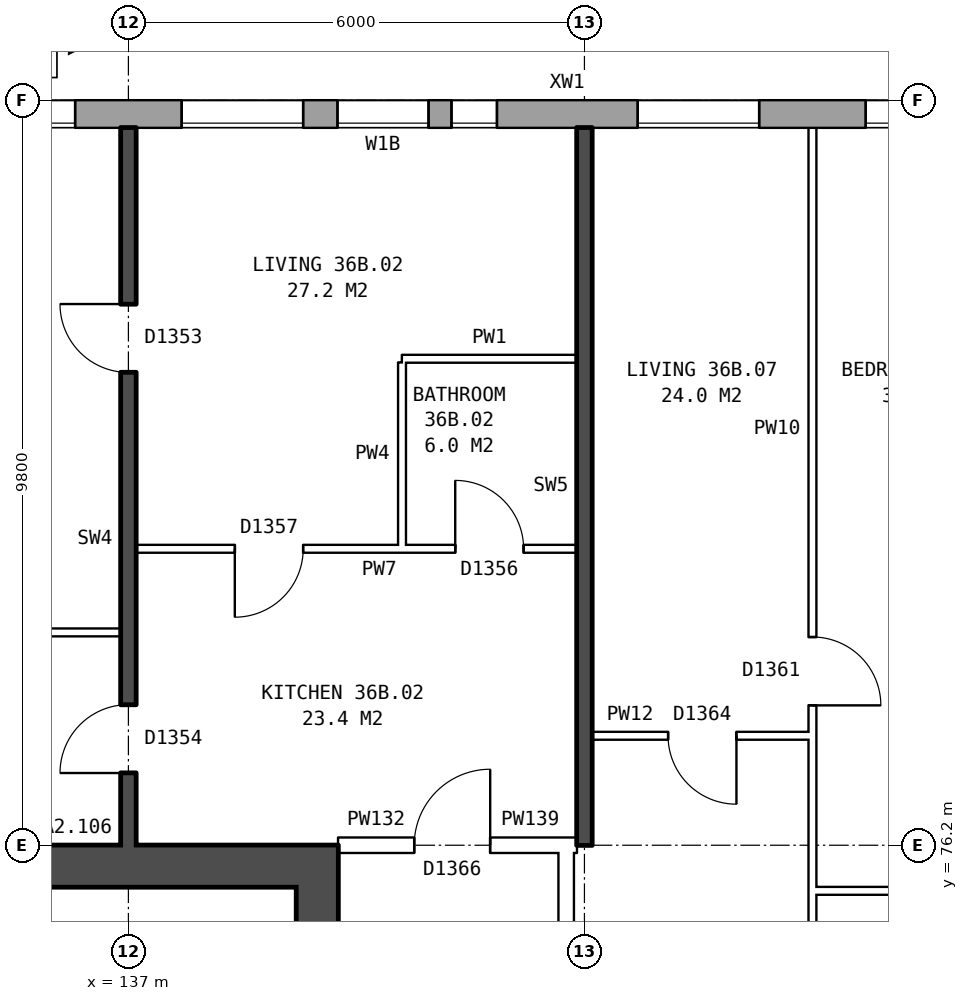
"""IFC4 building model, lengths in metres.
Left out: names, types, materials, properties, quantities, classifications, styles, units other than length and angle.
Written with IfcOpenShell. Run it as: python <this file> out.ifc"""

import sys

from ifc_helpers import new_model, si_unit, direction, frame, frame_2d, origin, place, context, subcontext, project, spatial, rectangle, extrude, element, fill, save


model = new_model("IFC4")
c1 = context("Model", 3, precision=1e-05, world=origin(), true_north=direction((0.0, 1.0)))
c2 = subcontext(c1, "Body", "Model", "MODEL_VIEW")
j1 = project(units=[si_unit("LENGTHUNIT", "METRE"), si_unit("PLANEANGLEUNIT", "RADIAN")], contexts=[c1])
p1 = place(None, origin())
s1 = spatial("IfcSite", under=j1, at=p1, CompositionType="ELEMENT")
p2 = place(p1, origin())
s2 = spatial("IfcBuilding", under=s1, at=p2, CompositionType="ELEMENT")
p3 = place(p2, frame((0.0, 0.0, 129.9)))
s3 = spatial("IfcBuildingStorey", under=s2, at=p3, CompositionType="ELEMENT", Elevation=129.9)
p4 = place(p3, frame((169.675, 85.82, 0.0), z_axis=(0.0, 0.0, 1.0), x_axis=(-1.0, 0.0, 0.0)))
e1 = element("IfcWall", 1, at=p4, inside=s3, PredefinedType="STANDARD", context=c2, shape_type="SweptSolid", body=[
    extrude(rectangle(XDim=35.601, YDim=0.36, at=frame_2d((17.8, 0.0))), origin(), (0.0, 0.0, 1.0), 2.85),
])
p5 = place(p4, frame((0.375, 0.0, 0.8)))
e2 = element("IfcOpeningElement", 2, at=p5, cuts=e1, PredefinedType="OPENING", context=c2, shape_type="SweptSolid", body=[
    extrude(rectangle(XDim=1.6, YDim=1.8, at=frame_2d((0.8, 0.9))), frame((0.0, 0.19, 0.0), z_axis=(0.0, -1.0, 0.0), x_axis=(1.0, 0.0, 0.0)), (0.0, 0.0, 1.0), 0.38),
])
p6 = place(p4, frame((3.375, 0.0, 0.8)))
e3 = element("IfcOpeningElement", 3, at=p6, cuts=e1, PredefinedType="OPENING", context=c2, shape_type="SweptSolid", body=[
    extrude(rectangle(XDim=1.6, YDim=1.8, at=frame_2d((0.8, 0.9))), frame((0.0, 0.19, 0.0), z_axis=(0.0, -1.0, 0.0), x_axis=(1.0, 0.0, 0.0)), (0.0, 0.0, 1.0), 0.38),
])
p7 = place(p4, frame((5.275, 0.0, 0.8)))
e4 = element("IfcOpeningElement", 4, at=p7, cuts=e1, PredefinedType="OPENING", context=c2, shape_type="SweptSolid", body=[
    extrude(rectangle(XDim=1.6, YDim=1.8, at=frame_2d((0.8, 0.9))), frame((0.0, 0.19, 0.0), z_axis=(0.0, -1.0, 0.0), x_axis=(1.0, 0.0, 0.0)), (0.0, 0.0, 1.0), 0.38),
])
p8 = place(p4, frame((9.375, 0.0, 0.8)))
e5 = element("IfcOpeningElement", 5, at=p8, cuts=e1, PredefinedType="OPENING", context=c2, shape_type="SweptSolid", body=[
    extrude(rectangle(XDim=1.6, YDim=1.8, at=frame_2d((0.8, 0.9))), frame((0.0, 0.19, 0.0), z_axis=(0.0, -1.0, 0.0), x_axis=(1.0, 0.0, 0.0)), (0.0, 0.0, 1.0), 0.38),
])
p9 = place(p4, frame((12.375, 0.0, 0.8)))
e6 = element("IfcOpeningElement", 6, at=p9, cuts=e1, PredefinedType="OPENING", context=c2, shape_type="SweptSolid", body=[
    extrude(rectangle(XDim=1.6, YDim=1.8, at=frame_2d((0.8, 0.9))), frame((0.0, 0.19, 0.0), z_axis=(0.0, -1.0, 0.0), x_axis=(1.0, 0.0, 0.0)), (0.0, 0.0, 1.0), 0.38),
])
p10 = place(p4, frame((15.375, 0.0, 0.8)))
e7 = element("IfcOpeningElement", 7, at=p10, cuts=e1, PredefinedType="OPENING", context=c2, shape_type="SweptSolid", body=[
    extrude(rectangle(XDim=1.6, YDim=1.8, at=frame_2d((0.8, 0.9))), frame((0.0, 0.19, 0.0), z_axis=(0.0, -1.0, 0.0), x_axis=(1.0, 0.0, 0.0)), (0.0, 0.0, 1.0), 0.38),
])
p11 = place(p4, frame((18.375, 0.0, 0.8)))
e8 = element("IfcOpeningElement", 8, at=p11, cuts=e1, PredefinedType="OPENING", context=c2, shape_type="SweptSolid", body=[
    extrude(rectangle(XDim=1.6, YDim=1.8, at=frame_2d((0.8, 0.9))), frame((0.0, 0.19, 0.0), z_axis=(0.0, -1.0, 0.0), x_axis=(1.0, 0.0, 0.0)), (0.0, 0.0, 1.0), 0.38),
])
p12 = place(p4, frame((21.375, 0.0, 0.8)))
e9 = element("IfcOpeningElement", 9, at=p12, cuts=e1, PredefinedType="OPENING", context=c2, shape_type="SweptSolid", body=[
    extrude(rectangle(XDim=1.6, YDim=1.8, at=frame_2d((0.8, 0.9))), frame((0.0, 0.19, 0.0), z_axis=(0.0, -1.0, 0.0), x_axis=(1.0, 0.0, 0.0)), (0.0, 0.0, 1.0), 0.38),
])
p13 = place(p4, frame((24.375, 0.0, 0.8)))
e10 = element("IfcOpeningElement", 10, at=p13, cuts=e1, PredefinedType="OPENING", context=c2, shape_type="SweptSolid", body=[
    extrude(rectangle(XDim=1.6, YDim=1.8, at=frame_2d((0.8, 0.9))), frame((0.0, 0.19, 0.0), z_axis=(0.0, -1.0, 0.0), x_axis=(1.0, 0.0, 0.0)), (0.0, 0.0, 1.0), 0.38),
])
p14 = place(p4, frame((27.825, 0.0, 1.7)))
e11 = element("IfcOpeningElement", 11, at=p14, cuts=e1, PredefinedType="OPENING", context=c2, shape_type="SweptSolid", body=[
    extrude(rectangle(XDim=0.6, YDim=0.9, at=frame_2d((0.3, 0.45))), frame((0.0, 0.19, 0.0), z_axis=(0.0, -1.0, 0.0), x_axis=(1.0, 0.0, 0.0)), (0.0, 0.0, 1.0), 0.38),
])
p15 = place(p4, frame((30.375, 0.0, 0.8)))
e12 = element("IfcOpeningElement", 12, at=p15, cuts=e1, PredefinedType="OPENING", context=c2, shape_type="SweptSolid", body=[
    extrude(rectangle(XDim=1.6, YDim=1.8, at=frame_2d((0.8, 0.9))), frame((0.0, 0.19, 0.0), z_axis=(0.0, -1.0, 0.0), x_axis=(1.0, 0.0, 0.0)), (0.0, 0.0, 1.0), 0.38),
])
p16 = place(p4, frame((33.375, 0.0, 0.8)))
e13 = element("IfcOpeningElement", 13, at=p16, cuts=e1, PredefinedType="OPENING", context=c2, shape_type="SweptSolid", body=[
    extrude(rectangle(XDim=1.6, YDim=1.8, at=frame_2d((0.8, 0.9))), frame((0.0, 0.19, 0.0), z_axis=(0.0, -1.0, 0.0), x_axis=(1.0, 0.0, 0.0)), (0.0, 0.0, 1.0), 0.38),
])
p17 = place(p4, frame((7.175, 0.0, 1.7)))
e14 = element("IfcOpeningElement", 14, at=p17, cuts=e1, PredefinedType="OPENING", context=c2, shape_type="SweptSolid", body=[
    extrude(rectangle(XDim=0.6, YDim=0.9, at=frame_2d((0.3, 0.45))), frame((0.0, 0.19, 0.0), z_axis=(0.0, -1.0, 0.0), x_axis=(1.0, 0.0, 0.0)), (0.0, 0.0, 1.0), 0.38),
])
p18 = place(p4, frame((28.725, 0.0, 0.8)))
e15 = element("IfcOpeningElement", 15, at=p18, cuts=e1, PredefinedType="OPENING", context=c2, shape_type="SweptSolid", body=[
    extrude(rectangle(XDim=1.2, YDim=1.8, at=frame_2d((0.6, 0.9))), frame((0.0, 0.19, 0.0), z_axis=(0.0, -1.0, 0.0), x_axis=(1.0, 0.0, 0.0)), (0.0, 0.0, 1.0), 0.38),
])
p19 = place(p3, frame((139.485, 63.8, 0.0), z_axis=(0.0, 0.0, 1.0), x_axis=(0.0, 1.0, 0.0)))
e16 = element("IfcWall", 16, at=p19, inside=s3, PredefinedType="SHEAR", context=c2, shape_type="SweptSolid", body=[
    extrude(rectangle(XDim=12.4, YDim=0.55, at=frame_2d((6.2, 0.0))), origin(), (0.0, 0.0, 1.0), 2.85),
])
p20 = place(p19, frame((1.325, 0.0, 0.0)))
e17 = element("IfcOpeningElement", 17, at=p20, cuts=e16, PredefinedType="OPENING", context=c2, shape_type="SweptSolid", body=[
    extrude(rectangle(XDim=1.1, YDim=2.1, at=frame_2d((0.55, 1.05))), frame((0.0, 0.285, 0.0), z_axis=(0.0, -1.0, 0.0), x_axis=(1.0, 0.0, 0.0)), (0.0, 0.0, 1.0), 0.57),
])
p21 = place(p19, frame((3.6, 0.0, 0.0)))
e18 = element("IfcOpeningElement", 18, at=p21, cuts=e16, PredefinedType="OPENING", context=c2, shape_type="SweptSolid", body=[
    extrude(rectangle(XDim=1.1, YDim=2.1, at=frame_2d((0.55, 1.05))), frame((0.0, 0.285, 0.0), z_axis=(0.0, -1.0, 0.0), x_axis=(1.0, 0.0, 0.0)), (0.0, 0.0, 1.0), 0.57),
])
p22 = place(p19, frame((5.8, 0.0, 0.0)))
e19 = element("IfcOpeningElement", 19, at=p22, cuts=e16, PredefinedType="OPENING", context=c2, shape_type="SweptSolid", body=[
    extrude(rectangle(XDim=1.1, YDim=2.1, at=frame_2d((0.55, 1.05))), frame((0.0, 0.285, 0.0), z_axis=(0.0, -1.0, 0.0), x_axis=(1.0, 0.0, 0.0)), (0.0, 0.0, 1.0), 0.57),
])
p23 = place(p19, frame((9.9, 0.0, 0.0)))
e20 = element("IfcOpeningElement", 20, at=p23, cuts=e16, PredefinedType="OPENING", context=c2, shape_type="SweptSolid", body=[
    extrude(rectangle(XDim=1.1, YDim=2.1, at=frame_2d((0.55, 1.05))), frame((0.0, 0.285, 0.0), z_axis=(0.0, -1.0, 0.0), x_axis=(1.0, 0.0, 0.0)), (0.0, 0.0, 1.0), 0.57),
])
p24 = place(p19, frame((8.125, 0.0, 0.0)))
e21 = element("IfcOpeningElement", 21, at=p24, cuts=e16, PredefinedType="OPENING", context=c2, shape_type="SweptSolid", body=[
    extrude(rectangle(XDim=0.85, YDim=2.1, at=frame_2d((0.425, 1.05))), frame((0.0, 0.285, 0.0), z_axis=(0.0, -1.0, 0.0), x_axis=(1.0, 0.0, 0.0)), (0.0, 0.0, 1.0), 0.57),
])
p25 = place(p3, frame((139.21, 75.925, 0.0), z_axis=(0.0, 0.0, 1.0), x_axis=(-1.0, 0.0, 0.0)))
e22 = element("IfcWall", 22, at=p25, inside=s3, PredefinedType="SHEAR", context=c2, shape_type="SweptSolid", body=[
    extrude(rectangle(XDim=7.3, YDim=0.55, at=frame_2d((3.65, 0.0))), origin(), (0.0, 0.0, 1.0), 2.85),
])
p26 = place(p3, frame((142.76, 63.9, 0.0), z_axis=(0.0, 0.0, 1.0), x_axis=(0.0, 1.0, 0.0)))
e23 = element("IfcWall", 23, at=p26, inside=s3, PredefinedType="PARTITIONING", context=c2, shape_type="SweptSolid", body=[
    extrude(rectangle(XDim=12.2, YDim=0.2, at=frame_2d((6.1, 0.0))), origin(), (0.0, 0.0, 1.0), 2.85),
])
p27 = place(p26, frame((5.1, 0.0, 0.0)))
e24 = element("IfcOpeningElement", 24, at=p27, cuts=e23, PredefinedType="OPENING", context=c2, shape_type="SweptSolid", body=[
    extrude(rectangle(XDim=2.0, YDim=2.1, at=frame_2d((1.0, 1.05))), frame((0.0, 0.11, 0.0), z_axis=(0.0, -1.0, 0.0), x_axis=(1.0, 0.0, 0.0)), (0.0, 0.0, 1.0), 0.22),
])
p28 = place(p3, frame((146.0, 75.6, 0.0), z_axis=(0.0, 0.0, 1.0), x_axis=(1.0, 0.0, 0.0)))
e25 = element("IfcWall", 25, at=p28, inside=s3, PredefinedType="PARTITIONING", context=c2, shape_type="SweptSolid", body=[
    extrude(rectangle(XDim=6.0, YDim=0.1, at=frame_2d((3.0, 0.0))), origin(), (0.0, 0.0, 1.0), 2.85),
])
p29 = place(p3, frame((139.76, 76.2, 0.0), z_axis=(0.0, 0.0, 1.0), x_axis=(1.0, 0.0, 0.0)))
e26 = element("IfcWall", 26, at=p29, inside=s3, PredefinedType="PARTITIONING", context=c2, shape_type="SweptSolid", body=[
    extrude(rectangle(XDim=3.0, YDim=0.2, at=frame_2d((1.5, 0.0))), origin(), (0.0, 0.0, 1.0), 2.85),
])
p30 = place(p29, frame((1.0, 0.0, 0.0)))
e27 = element("IfcOpeningElement", 27, at=p30, cuts=e26, PredefinedType="OPENING", context=c2, shape_type="SweptSolid", body=[
    extrude(rectangle(XDim=1.0, YDim=2.1, at=frame_2d((0.5, 1.05))), frame((0.0, 0.11, 0.0), z_axis=(0.0, -1.0, 0.0), x_axis=(1.0, 0.0, 0.0)), (0.0, 0.0, 1.0), 0.22),
])
p31 = place(p3, frame((142.76, 76.2, 0.0), z_axis=(0.0, 0.0, 1.0), x_axis=(1.0, 0.0, 0.0)))
e28 = element("IfcWall", 28, at=p31, inside=s3, PredefinedType="PARTITIONING", context=c2, shape_type="SweptSolid", body=[
    extrude(rectangle(XDim=0.14, YDim=0.2, at=frame_2d((0.07, 0.0))), origin(), (0.0, 0.0, 1.0), 2.85),
])
p32 = place(p3, frame((143.1, 77.64, 0.0), z_axis=(0.0, 0.0, 1.0), x_axis=(1.0, 0.0, 0.0)))
e29 = element("IfcWall", 29, at=p32, inside=s3, PredefinedType="PARTITIONING", context=c2, shape_type="SweptSolid", body=[
    extrude(rectangle(XDim=2.9, YDim=0.1, at=frame_2d((1.45, 0.0))), origin(), (0.0, 0.0, 1.0), 2.85),
])
p33 = place(p32, frame((1.0, 0.0, 0.0)))
e30 = element("IfcOpeningElement", 30, at=p33, cuts=e29, PredefinedType="OPENING", context=c2, shape_type="SweptSolid", body=[
    extrude(rectangle(XDim=0.9, YDim=2.1, at=frame_2d((0.45, 1.05))), frame((0.0, 0.06, 0.0), z_axis=(0.0, -1.0, 0.0), x_axis=(1.0, 0.0, 0.0)), (0.0, 0.0, 1.0), 0.12),
])
p34 = place(p3, frame((131.36, 79.0, 0.0), z_axis=(0.0, 0.0, 1.0), x_axis=(1.0, 0.0, 0.0)))
e31 = element("IfcWall", 31, at=p34, inside=s3, PredefinedType="PARTITIONING", context=c2, shape_type="SweptSolid", body=[
    extrude(rectangle(XDim=5.54, YDim=0.1, at=frame_2d((2.77, 0.0))), origin(), (0.0, 0.0, 1.0), 2.85),
])
p35 = place(p3, frame((137.1, 80.1, 0.0), z_axis=(0.0, 0.0, 1.0), x_axis=(1.0, 0.0, 0.0)))
e32 = element("IfcWall", 32, at=p35, inside=s3, PredefinedType="PARTITIONING", context=c2, shape_type="SweptSolid", body=[
    extrude(rectangle(XDim=5.8, YDim=0.1, at=frame_2d((2.9, 0.0))), origin(), (0.0, 0.0, 1.0), 2.85),
])
p36 = place(p35, frame((1.3, 0.0, 0.0)))
e33 = element("IfcOpeningElement", 33, at=p36, cuts=e32, PredefinedType="OPENING", context=c2, shape_type="SweptSolid", body=[
    extrude(rectangle(XDim=0.9, YDim=2.1, at=frame_2d((0.45, 1.05))), frame((0.0, 0.06, 0.0), z_axis=(0.0, -1.0, 0.0), x_axis=(1.0, 0.0, 0.0)), (0.0, 0.0, 1.0), 0.12),
])
p37 = place(p35, frame((4.2, 0.0, 0.0)))
e34 = element("IfcOpeningElement", 34, at=p37, cuts=e32, PredefinedType="OPENING", context=c2, shape_type="SweptSolid", body=[
    extrude(rectangle(XDim=0.9, YDim=2.1, at=frame_2d((0.45, 1.05))), frame((0.0, 0.06, 0.0), z_axis=(0.0, -1.0, 0.0), x_axis=(1.0, 0.0, 0.0)), (0.0, 0.0, 1.0), 0.12),
])
p38 = place(p3, frame((140.6, 82.6, 0.0), z_axis=(0.0, 0.0, 1.0), x_axis=(1.0, 0.0, 0.0)))
e35 = element("IfcWall", 35, at=p38, inside=s3, PredefinedType="PARTITIONING", context=c2, shape_type="SweptSolid", body=[
    extrude(rectangle(XDim=2.3, YDim=0.1, at=frame_2d((1.15, 0.0))), origin(), (0.0, 0.0, 1.0), 2.85),
])
p39 = place(p3, frame((137.0, 76.2, 0.0), z_axis=(0.0, 0.0, 1.0), x_axis=(0.0, 1.0, 0.0)))
e36 = element("IfcWall", 36, at=p39, inside=s3, PredefinedType="SOLIDWALL", context=c2, shape_type="SweptSolid", body=[
    extrude(rectangle(XDim=9.44, YDim=0.2, at=frame_2d((4.72, 0.0))), origin(), (0.0, 0.0, 1.0), 2.85),
])
p40 = place(p39, frame((6.22, 0.0, 0.0)))
e37 = element("IfcOpeningElement", 37, at=p40, cuts=e36, PredefinedType="OPENING", context=c2, shape_type="SweptSolid", body=[
    extrude(rectangle(XDim=0.9, YDim=2.1, at=frame_2d((0.45, 1.05))), frame((0.0, 0.11, 0.0), z_axis=(0.0, -1.0, 0.0), x_axis=(1.0, 0.0, 0.0)), (0.0, 0.0, 1.0), 0.22),
])
p41 = place(p39, frame((0.95, 0.0, 0.0)))
e38 = element("IfcOpeningElement", 38, at=p41, cuts=e36, PredefinedType="OPENING", context=c2, shape_type="SweptSolid", body=[
    extrude(rectangle(XDim=0.9, YDim=2.1, at=frame_2d((0.45, 1.05))), frame((0.0, 0.11, 0.0), z_axis=(0.0, -1.0, 0.0), x_axis=(1.0, 0.0, 0.0)), (0.0, 0.0, 1.0), 0.22),
])
p42 = place(p3, frame((140.6, 80.15, 0.0), z_axis=(0.0, 0.0, 1.0), x_axis=(0.0, 1.0, 0.0)))
e39 = element("IfcWall", 39, at=p42, inside=s3, PredefinedType="PARTITIONING", context=c2, shape_type="SweptSolid", body=[
    extrude(rectangle(XDim=2.4, YDim=0.1, at=frame_2d((1.2, 0.0))), origin(), (0.0, 0.0, 1.0), 2.85),
])
p43 = place(p3, frame((143.0, 76.2, 0.0), z_axis=(0.0, 0.0, 1.0), x_axis=(0.0, 1.0, 0.0)))
e40 = element("IfcWall", 40, at=p43, inside=s3, PredefinedType="SOLIDWALL", context=c2, shape_type="SweptSolid", body=[
    extrude(rectangle(XDim=9.44, YDim=0.2, at=frame_2d((4.72, 0.0))), origin(), (0.0, 0.0, 1.0), 2.85),
])
p44 = place(p3, frame((146.0, 71.3, 0.0), z_axis=(0.0, 0.0, 1.0), x_axis=(0.0, 1.0, 0.0)))
e41 = element("IfcWall", 41, at=p44, inside=s3, PredefinedType="PARTITIONING", context=c2, shape_type="SweptSolid", body=[
    extrude(rectangle(XDim=14.34, YDim=0.1, at=frame_2d((7.17, 0.0))), origin(), (0.0, 0.0, 1.0), 2.85),
])
p45 = place(p44, frame((6.74, 0.0, 0.0)))
e42 = element("IfcOpeningElement", 42, at=p45, cuts=e41, PredefinedType="OPENING", context=c2, shape_type="SweptSolid", body=[
    extrude(rectangle(XDim=0.9, YDim=2.1, at=frame_2d((0.45, 1.05))), frame((0.0, 0.06, 0.0), z_axis=(0.0, -1.0, 0.0), x_axis=(1.0, 0.0, 0.0)), (0.0, 0.0, 1.0), 0.12),
])
p46 = place(p44, frame((0.4, 0.0, 0.0)))
e43 = element("IfcOpeningElement", 43, at=p46, cuts=e41, PredefinedType="OPENING", context=c2, shape_type="SweptSolid", body=[
    extrude(rectangle(XDim=0.9, YDim=2.1, at=frame_2d((0.45, 1.05))), frame((0.0, 0.06, 0.0), z_axis=(0.0, -1.0, 0.0), x_axis=(1.0, 0.0, 0.0)), (0.0, 0.0, 1.0), 0.12),
])
p47 = place(p12, origin())
e44 = element("IfcWindow", 44, at=p47, inside=s3, PartitioningType="SINGLE_PANEL", PredefinedType="WINDOW", context=c2, shape_type="SweptSolid", body=[
    extrude(rectangle(XDim=1.6, YDim=1.8, at=frame_2d((0.8, 0.9))), frame((0.0, 0.15, 0.0), z_axis=(0.0, -1.0, 0.0), x_axis=(1.0, 0.0, 0.0)), (0.0, 0.0, 1.0), 0.06),
])
fill(e9, e44)
p48 = place(p13, origin())
e45 = element("IfcWindow", 45, at=p48, inside=s3, PartitioningType="SINGLE_PANEL", PredefinedType="WINDOW", context=c2, shape_type="SweptSolid", body=[
    extrude(rectangle(XDim=1.6, YDim=1.8, at=frame_2d((0.8, 0.9))), frame((0.0, 0.15, 0.0), z_axis=(0.0, -1.0, 0.0), x_axis=(1.0, 0.0, 0.0)), (0.0, 0.0, 1.0), 0.06),
])
fill(e10, e45)
p49 = place(p14, origin())
e46 = element("IfcWindow", 46, at=p49, inside=s3, PartitioningType="SINGLE_PANEL", PredefinedType="WINDOW", context=c2, shape_type="SweptSolid", body=[
    extrude(rectangle(XDim=0.6, YDim=0.9, at=frame_2d((0.3, 0.45))), frame((0.0, 0.15, 0.0), z_axis=(0.0, -1.0, 0.0), x_axis=(1.0, 0.0, 0.0)), (0.0, 0.0, 1.0), 0.06),
])
fill(e11, e46)
p50 = place(p15, origin())
e47 = element("IfcWindow", 47, at=p50, inside=s3, PartitioningType="SINGLE_PANEL", PredefinedType="WINDOW", context=c2, shape_type="SweptSolid", body=[
    extrude(rectangle(XDim=1.6, YDim=1.8, at=frame_2d((0.8, 0.9))), frame((0.0, 0.15, 0.0), z_axis=(0.0, -1.0, 0.0), x_axis=(1.0, 0.0, 0.0)), (0.0, 0.0, 1.0), 0.06),
])
fill(e12, e47)
p51 = place(p16, origin())
e48 = element("IfcWindow", 48, at=p51, inside=s3, PartitioningType="SINGLE_PANEL", PredefinedType="WINDOW", context=c2, shape_type="SweptSolid", body=[
    extrude(rectangle(XDim=1.6, YDim=1.8, at=frame_2d((0.8, 0.9))), frame((0.0, 0.15, 0.0), z_axis=(0.0, -1.0, 0.0), x_axis=(1.0, 0.0, 0.0)), (0.0, 0.0, 1.0), 0.06),
])
fill(e13, e48)
p52 = place(p40, origin())
e49 = element("IfcDoor", 49, at=p52, inside=s3, OperationType="SINGLE_SWING_RIGHT", PredefinedType="DOOR", context=c2, shape_type="SweptSolid", body=[
    extrude(rectangle(XDim=0.9, YDim=2.1, at=frame_2d((0.45, 1.05))), frame((0.0, 0.025, 0.0), z_axis=(0.0, -1.0, 0.0), x_axis=(1.0, 0.0, 0.0)), (0.0, 0.0, 1.0), 0.05),
])
fill(e37, e49)
p53 = place(p41, origin())
e50 = element("IfcDoor", 50, at=p53, inside=s3, OperationType="SINGLE_SWING_LEFT", PredefinedType="DOOR", context=c2, shape_type="SweptSolid", body=[
    extrude(rectangle(XDim=0.9, YDim=2.1, at=frame_2d((0.45, 1.05))), frame((0.0, 0.025, 0.0), z_axis=(0.0, -1.0, 0.0), x_axis=(1.0, 0.0, 0.0)), (0.0, 0.0, 1.0), 0.05),
])
fill(e38, e50)
p54 = place(p30, origin())
e51 = element("IfcDoor", 51, at=p54, inside=s3, OperationType="SINGLE_SWING_RIGHT", PredefinedType="DOOR", context=c2, shape_type="SweptSolid", body=[
    extrude(rectangle(XDim=1.0, YDim=2.1, at=frame_2d((0.5, 1.05))), frame((0.0, 0.025, 0.0), z_axis=(0.0, -1.0, 0.0), x_axis=(1.0, 0.0, 0.0)), (0.0, 0.0, 1.0), 0.05),
])
fill(e27, e51)
p55 = place(p36, frame((0.9, 0.0, 0.0), z_axis=(0.0, 0.0, 1.0), x_axis=(-1.0, 0.0, 0.0)))
e52 = element("IfcDoor", 52, at=p55, inside=s3, OperationType="SINGLE_SWING_RIGHT", PredefinedType="DOOR", context=c2, shape_type="SweptSolid", body=[
    extrude(rectangle(XDim=0.9, YDim=2.1, at=frame_2d((0.45, 1.05))), frame((0.0, 0.025, 0.0), z_axis=(0.0, -1.0, 0.0), x_axis=(1.0, 0.0, 0.0)), (0.0, 0.0, 1.0), 0.05),
])
fill(e33, e52)
p56 = place(p37, origin())
e53 = element("IfcDoor", 53, at=p56, inside=s3, OperationType="SINGLE_SWING_LEFT", PredefinedType="DOOR", context=c2, shape_type="SweptSolid", body=[
    extrude(rectangle(XDim=0.9, YDim=2.1, at=frame_2d((0.45, 1.05))), frame((0.0, 0.025, 0.0), z_axis=(0.0, -1.0, 0.0), x_axis=(1.0, 0.0, 0.0)), (0.0, 0.0, 1.0), 0.05),
])
fill(e34, e53)
p57 = place(p45, frame((0.9, 0.0, 0.0), z_axis=(0.0, 0.0, 1.0), x_axis=(-1.0, 0.0, 0.0)))
e54 = element("IfcDoor", 54, at=p57, inside=s3, OperationType="SINGLE_SWING_RIGHT", PredefinedType="DOOR", context=c2, shape_type="SweptSolid", body=[
    extrude(rectangle(XDim=0.9, YDim=2.1, at=frame_2d((0.45, 1.05))), frame((0.0, 0.025, 0.0), z_axis=(0.0, -1.0, 0.0), x_axis=(1.0, 0.0, 0.0)), (0.0, 0.0, 1.0), 0.05),
])
fill(e42, e54)
p58 = place(p33, frame((0.9, 0.0, 0.0), z_axis=(0.0, 0.0, 1.0), x_axis=(-1.0, 0.0, 0.0)))
e55 = element("IfcDoor", 55, at=p58, inside=s3, OperationType="SINGLE_SWING_LEFT", PredefinedType="DOOR", context=c2, shape_type="SweptSolid", body=[
    extrude(rectangle(XDim=0.9, YDim=2.1, at=frame_2d((0.45, 1.05))), frame((0.0, 0.025, 0.0), z_axis=(0.0, -1.0, 0.0), x_axis=(1.0, 0.0, 0.0)), (0.0, 0.0, 1.0), 0.05),
])
fill(e30, e55)
p59 = place(p18, origin())
e56 = element("IfcWindow", 56, at=p59, inside=s3, PartitioningType="SINGLE_PANEL", PredefinedType="WINDOW", context=c2, shape_type="SweptSolid", body=[
    extrude(rectangle(XDim=1.2, YDim=1.8, at=frame_2d((0.6, 0.9))), frame((0.0, 0.15, 0.0), z_axis=(0.0, -1.0, 0.0), x_axis=(1.0, 0.0, 0.0)), (0.0, 0.0, 1.0), 0.06),
])
fill(e15, e56)
save(model, sys.argv[1])
